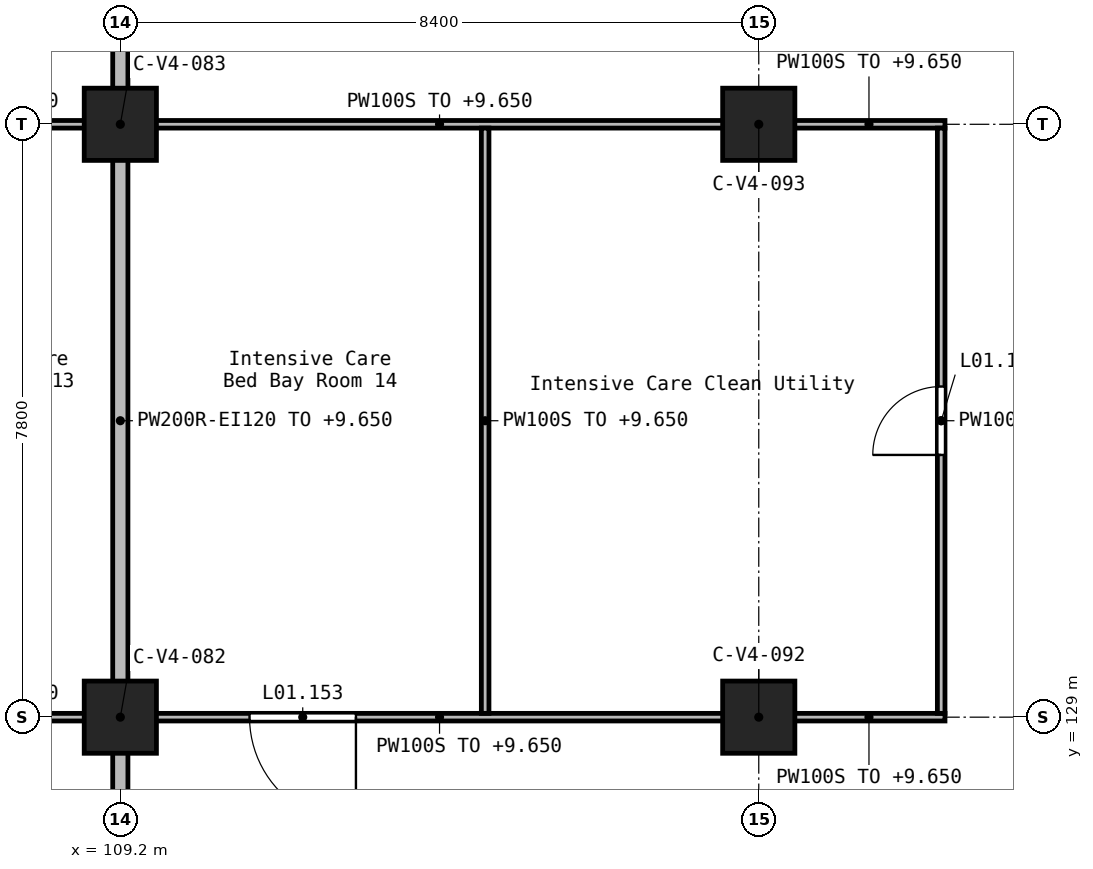
"""IFC4 building model, lengths in metres.
Left out: names, types, materials, properties, quantities, classifications, styles, units other than length and angle.
Written with IfcOpenShell. Run it as: python <this file> out.ifc"""

import sys

from ifc_helpers import new_model, si_unit, direction, frame, frame_2d, origin, origin_2d, place, context, subcontext, project, spatial, rectangle, extrude, element, fill, save


model = new_model("IFC4")
c1 = context("Model", 3, precision=1e-05, world=origin(), true_north=direction((0.0, 1.0)))
c2 = subcontext(c1, "Body", "Model", "MODEL_VIEW")
j1 = project(units=[si_unit("LENGTHUNIT", "METRE"), si_unit("PLANEANGLEUNIT", "RADIAN")], contexts=[c1])
p1 = place(None, origin())
s1 = spatial("IfcSite", under=j1, at=p1, CompositionType="ELEMENT")
p2 = place(p1, origin())
s2 = spatial("IfcBuilding", under=s1, at=p2, CompositionType="ELEMENT")
p3 = place(p2, frame((0.0, 0.0, 5.4)))
s3 = spatial("IfcBuildingStorey", under=s2, at=p3, CompositionType="ELEMENT", Elevation=5.4)
for number, where, z_axis, x_axis in (
    (1, (109.2, 129.0, 0.0), (0.0, 0.0, 1.0), (1.0, 0.0, 0.0)),
    (2, (109.2, 136.8, 0.0), (0.0, 0.0, 1.0), (1.0, 0.0, 0.0)),
    (3, (117.6, 129.0, 0.0), (0.0, 0.0, 1.0), (1.0, 0.0, 0.0)),
    (4, (117.6, 136.8, 0.0), (0.0, 0.0, 1.0), (1.0, 0.0, 0.0)),
):
    element("IfcColumn", number, at=place(p3, frame(where, z_axis=z_axis, x_axis=x_axis)), inside=s3, PredefinedType="COLUMN", context=c2, shape_type="SweptSolid", body=[
        extrude(rectangle(XDim=0.95, YDim=0.95, at=origin_2d()), origin(), (0.0, 0.0, 1.0), 4.5),
    ])
p4 = place(p3, frame((109.2, 139.9, 0.0), z_axis=(0.0, 0.0, 1.0), x_axis=(0.0, -1.0, 0.0)))
e5 = element("IfcWall", 5, at=p4, inside=s3, PredefinedType="SOLIDWALL", context=c2, shape_type="SweptSolid", body=[
    extrude(rectangle(XDim=2.65, YDim=0.2, at=frame_2d((1.325, 0.0))), origin(), (0.0, 0.0, 1.0), 4.25),
])
p5 = place(p3, frame((109.2, 136.35, 0.0), z_axis=(0.0, 0.0, 1.0), x_axis=(0.0, -1.0, 0.0)))
e6 = element("IfcWall", 6, at=p5, inside=s3, PredefinedType="SOLIDWALL", context=c2, shape_type="SweptSolid", body=[
    extrude(rectangle(XDim=6.9, YDim=0.2, at=frame_2d((3.45, 0.0))), origin(), (0.0, 0.0, 1.0), 4.25),
])
p6 = place(p3, frame((109.2, 128.55, 0.0), z_axis=(0.0, 0.0, 1.0), x_axis=(0.0, -1.0, 0.0)))
e7 = element("IfcWall", 7, at=p6, inside=s3, PredefinedType="SOLIDWALL", context=c2, shape_type="SweptSolid", body=[
    extrude(rectangle(XDim=2.7, YDim=0.2, at=frame_2d((1.35, 0.0))), origin(), (0.0, 0.0, 1.0), 4.25),
])
p7 = place(p3, frame((120.05, 129.0, 0.0), z_axis=(0.0, 0.0, 1.0), x_axis=(-1.0, 0.0, 0.0)))
e8 = element("IfcWall", 8, at=p7, inside=s3, PredefinedType="PARTITIONING", context=c2, shape_type="SweptSolid", body=[
    extrude(rectangle(XDim=2.0, YDim=0.1, at=frame_2d((1.0, 0.0))), origin(), (0.0, 0.0, 1.0), 4.25),
])
p8 = place(p3, frame((117.15, 129.0, 0.0), z_axis=(0.0, 0.0, 1.0), x_axis=(-1.0, 0.0, 0.0)))
e9 = element("IfcWall", 9, at=p8, inside=s3, PredefinedType="PARTITIONING", context=c2, shape_type="SweptSolid", body=[
    extrude(rectangle(XDim=7.5, YDim=0.1, at=frame_2d((3.75, 0.0))), origin(), (0.0, 0.0, 1.0), 4.25),
])
p9 = place(p8, frame((4.85, 0.0, 0.0)))
e10 = element("IfcOpeningElement", 10, at=p9, cuts=e9, PredefinedType="OPENING", context=c2, shape_type="SweptSolid", body=[
    extrude(rectangle(XDim=1.4, YDim=2.1, at=frame_2d((0.7, 1.05))), frame((0.0, 0.06, 0.0), z_axis=(0.0, -1.0, 0.0), x_axis=(1.0, 0.0, 0.0)), (0.0, 0.0, 1.0), 0.12),
])
p10 = place(p3, frame((108.75, 129.0, 0.0), z_axis=(0.0, 0.0, 1.0), x_axis=(-1.0, 0.0, 0.0)))
e11 = element("IfcWall", 11, at=p10, inside=s3, PredefinedType="PARTITIONING", context=c2, shape_type="SweptSolid", body=[
    extrude(rectangle(XDim=7.5, YDim=0.1, at=frame_2d((3.75, 0.0))), origin(), (0.0, 0.0, 1.0), 4.25),
])
p11 = place(p10, frame((0.65, 0.0, 0.0)))
e12 = element("IfcOpeningElement", 12, at=p11, cuts=e11, PredefinedType="OPENING", context=c2, shape_type="SweptSolid", body=[
    extrude(rectangle(XDim=1.4, YDim=2.1, at=frame_2d((0.7, 1.05))), frame((0.0, 0.06, 0.0), z_axis=(0.0, -1.0, 0.0), x_axis=(1.0, 0.0, 0.0)), (0.0, 0.0, 1.0), 0.12),
])
p12 = place(p3, frame((120.05, 136.8, 0.0), z_axis=(0.0, 0.0, 1.0), x_axis=(-1.0, 0.0, 0.0)))
e13 = element("IfcWall", 13, at=p12, inside=s3, PredefinedType="PARTITIONING", context=c2, shape_type="SweptSolid", body=[
    extrude(rectangle(XDim=2.0, YDim=0.1, at=frame_2d((1.0, 0.0))), origin(), (0.0, 0.0, 1.0), 4.25),
])
for number, where, z_axis, x_axis in (
    (14, (117.15, 136.8, 0.0), (0.0, 0.0, 1.0), (-1.0, 0.0, 0.0)),
    (15, (108.75, 136.8, 0.0), (0.0, 0.0, 1.0), (-1.0, 0.0, 0.0)),
):
    element("IfcWall", number, at=place(p3, frame(where, z_axis=z_axis, x_axis=x_axis)), inside=s3, PredefinedType="PARTITIONING", context=c2, shape_type="SweptSolid", body=[
        extrude(rectangle(XDim=7.5, YDim=0.1, at=frame_2d((3.75, 0.0))), origin(), (0.0, 0.0, 1.0), 4.25),
    ])
p13 = place(p3, frame((114.0, 129.05, 0.0), z_axis=(0.0, 0.0, 1.0), x_axis=(0.0, 1.0, 0.0)))
e16 = element("IfcWall", 16, at=p13, inside=s3, PredefinedType="PARTITIONING", context=c2, shape_type="SweptSolid", body=[
    extrude(rectangle(XDim=7.7, YDim=0.1, at=frame_2d((3.85, 0.0))), origin(), (0.0, 0.0, 1.0), 4.25),
])
p14 = place(p3, frame((120.0, 129.05, 0.0), z_axis=(0.0, 0.0, 1.0), x_axis=(0.0, 1.0, 0.0)))
e17 = element("IfcWall", 17, at=p14, inside=s3, PredefinedType="PARTITIONING", context=c2, shape_type="SweptSolid", body=[
    extrude(rectangle(XDim=7.7, YDim=0.1, at=frame_2d((3.85, 0.0))), origin(), (0.0, 0.0, 1.0), 4.25),
])
p15 = place(p14, frame((3.4, 0.0, 0.0)))
e18 = element("IfcOpeningElement", 18, at=p15, cuts=e17, PredefinedType="OPENING", context=c2, shape_type="SweptSolid", body=[
    extrude(rectangle(XDim=0.9, YDim=2.1, at=frame_2d((0.45, 1.05))), frame((0.0, 0.06, 0.0), z_axis=(0.0, -1.0, 0.0), x_axis=(1.0, 0.0, 0.0)), (0.0, 0.0, 1.0), 0.12),
])
p16 = place(p9, frame((1.4, 0.0, 0.0), z_axis=(0.0, 0.0, 1.0), x_axis=(-1.0, 0.0, 0.0)))
e19 = element("IfcDoor", 19, at=p16, inside=s3, OperationType="DOUBLE_DOOR_SINGLE_SWING", PredefinedType="DOOR", context=c2, shape_type="SweptSolid", body=[
    extrude(rectangle(XDim=1.4, YDim=2.1, at=frame_2d((0.7, 1.05))), frame((0.0, 0.025, 0.0), z_axis=(0.0, -1.0, 0.0), x_axis=(1.0, 0.0, 0.0)), (0.0, 0.0, 1.0), 0.05),
])
fill(e10, e19)
p17 = place(p15, origin())
e20 = element("IfcDoor", 20, at=p17, inside=s3, OperationType="SINGLE_SWING_LEFT", PredefinedType="DOOR", context=c2, shape_type="SweptSolid", body=[
    extrude(rectangle(XDim=0.9, YDim=2.1, at=frame_2d((0.45, 1.05))), frame((0.0, 0.025, 0.0), z_axis=(0.0, -1.0, 0.0), x_axis=(1.0, 0.0, 0.0)), (0.0, 0.0, 1.0), 0.05),
])
fill(e18, e20)
save(model, sys.argv[1])
